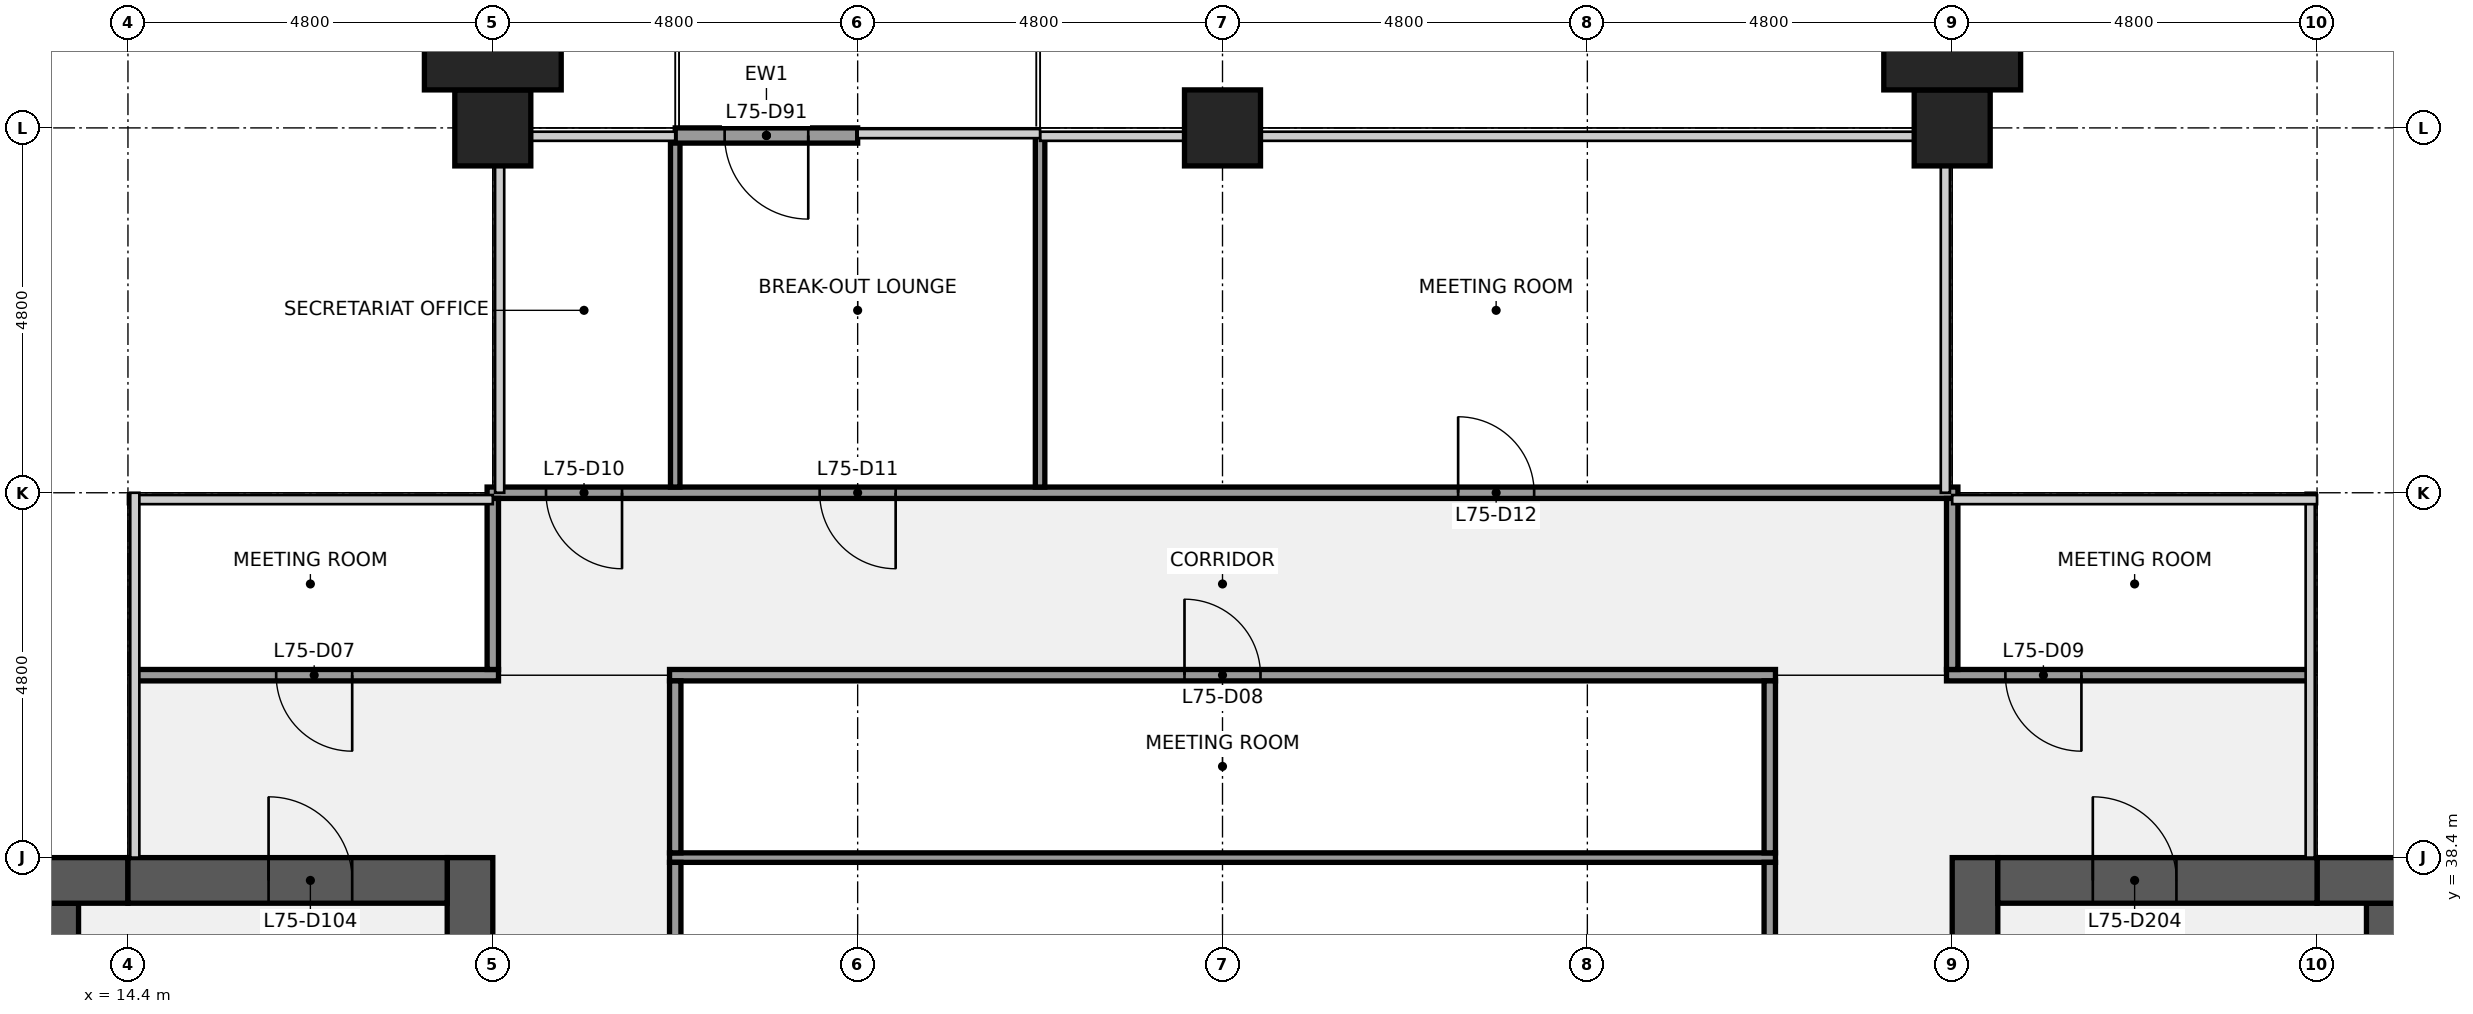
"""IFC4 building model, lengths in metres.
Left out: names, types, materials, properties, quantities, classifications, styles, units other than length and angle.
Written with IfcOpenShell. Run it as: python <this file> out.ifc"""

import sys

from ifc_helpers import new_model, si_unit, direction, frame, frame_2d, origin, origin_2d, place, context, subcontext, project, spatial, rectangle, extrude, element, fill, save


model = new_model("IFC4")
c1 = context("Model", 3, precision=1e-05, world=origin(), true_north=direction((0.0, 1.0)))
c2 = subcontext(c1, "Body", "Model", "MODEL_VIEW")
j1 = project(units=[si_unit("LENGTHUNIT", "METRE"), si_unit("PLANEANGLEUNIT", "RADIAN")], contexts=[c1])
p1 = place(None, origin())
s1 = spatial("IfcSite", under=j1, at=p1, CompositionType="ELEMENT")
p2 = place(p1, origin())
s2 = spatial("IfcBuilding", under=s1, at=p2, CompositionType="ELEMENT")
p3 = place(p2, frame((0.0, 0.0, 338.3)))
s3 = spatial("IfcBuildingStorey", under=s2, at=p3, CompositionType="ELEMENT", Elevation=338.3)
for number, where, z_axis, x_axis in (
    (1, (19.2, 48.0, 0.0), (0.0, 0.0, 1.0), (1.0, 0.0, 0.0)),
    (2, (28.8, 48.0, 0.0), (0.0, 0.0, 1.0), (1.0, 0.0, 0.0)),
    (3, (38.4, 48.0, 0.0), (0.0, 0.0, 1.0), (1.0, 0.0, 0.0)),
):
    element("IfcColumn", number, at=place(p3, frame(where, z_axis=z_axis, x_axis=x_axis)), inside=s3, PredefinedType="COLUMN", context=c2, shape_type="SweptSolid", body=[
        extrude(rectangle(XDim=1.0, YDim=1.0, at=origin_2d()), origin(), (0.0, 0.0, 1.0), 4.0),
    ])
p4 = place(p3, frame((18.9, 38.4, 0.0), z_axis=(0.0, 0.0, 1.0), x_axis=(0.0, -1.0, 0.0)))
e4 = element("IfcWall", 4, at=p4, inside=s3, PredefinedType="SHEAR", context=c2, shape_type="SweptSolid", body=[
    extrude(rectangle(XDim=28.8, YDim=0.6, at=frame_2d((14.4, 0.0))), origin(), (0.0, 0.0, 1.0), 3.84),
])
p5 = place(p4, frame((18.3, 0.0, 0.0)))
e5 = element("IfcOpeningElement", 5, at=p5, cuts=e4, PredefinedType="OPENING", context=c2, shape_type="SweptSolid", body=[
    extrude(rectangle(XDim=1.8, YDim=2.1, at=frame_2d((0.9, 1.05))), frame((0.0, 0.31, 0.0), z_axis=(0.0, -1.0, 0.0), x_axis=(1.0, 0.0, 0.0)), (0.0, 0.0, 1.0), 0.62),
])
p6 = place(p4, frame((8.7, 0.0, 0.0)))
e6 = element("IfcOpeningElement", 6, at=p6, cuts=e4, PredefinedType="OPENING", context=c2, shape_type="SweptSolid", body=[
    extrude(rectangle(XDim=1.8, YDim=2.1, at=frame_2d((0.9, 1.05))), frame((0.0, 0.31, 0.0), z_axis=(0.0, -1.0, 0.0), x_axis=(1.0, 0.0, 0.0)), (0.0, 0.0, 1.0), 0.62),
])
p7 = place(p3, frame((6.25, 37.5, 0.0), z_axis=(0.0, 0.0, 1.0), x_axis=(1.0, 0.0, 0.0)))
e7 = element("IfcWall", 7, at=p7, inside=s3, PredefinedType="SHEAR", context=c2, shape_type="SweptSolid", body=[
    extrude(rectangle(XDim=7.5, YDim=0.6, at=frame_2d((3.75, 0.0))), origin(), (0.0, 0.0, 1.0), 3.84),
])
p8 = place(p3, frame((0.6, 38.1, 0.0), z_axis=(0.0, 0.0, 1.0), x_axis=(1.0, 0.0, 0.0)))
e8 = element("IfcWall", 8, at=p8, inside=s3, PredefinedType="SHEAR", context=c2, shape_type="SweptSolid", body=[
    extrude(rectangle(XDim=13.8, YDim=0.6, at=frame_2d((6.9, 0.0))), origin(), (0.0, 0.0, 1.0), 3.84),
])
p9 = place(p8, frame((5.7, 0.0, 0.9)))
e9 = element("IfcOpeningElement", 9, at=p9, cuts=e8, PredefinedType="OPENING", context=c2, shape_type="SweptSolid", body=[
    extrude(rectangle(XDim=1.8, YDim=1.5, at=frame_2d((0.9, 0.75))), frame((0.0, 0.31, 0.0), z_axis=(0.0, -1.0, 0.0), x_axis=(1.0, 0.0, 0.0)), (0.0, 0.0, 1.0), 0.62),
])
p10 = place(p8, frame((10.5, 0.0, 0.9)))
e10 = element("IfcOpeningElement", 10, at=p10, cuts=e8, PredefinedType="OPENING", context=c2, shape_type="SweptSolid", body=[
    extrude(rectangle(XDim=1.8, YDim=1.5, at=frame_2d((0.9, 0.75))), frame((0.0, 0.31, 0.0), z_axis=(0.0, -1.0, 0.0), x_axis=(1.0, 0.0, 0.0)), (0.0, 0.0, 1.0), 0.62),
])
p11 = place(p3, frame((14.4, 38.1, 0.0), z_axis=(0.0, 0.0, 1.0), x_axis=(1.0, 0.0, 0.0)))
e11 = element("IfcWall", 11, at=p11, inside=s3, PredefinedType="SHEAR", context=c2, shape_type="SweptSolid", body=[
    extrude(rectangle(XDim=4.2, YDim=0.6, at=frame_2d((2.1, 0.0))), origin(), (0.0, 0.0, 1.0), 3.84),
])
p12 = place(p11, frame((1.85, 0.0, 0.0)))
e12 = element("IfcOpeningElement", 12, at=p12, cuts=e11, PredefinedType="OPENING", context=c2, shape_type="SweptSolid", body=[
    extrude(rectangle(XDim=1.1, YDim=2.1, at=frame_2d((0.55, 1.05))), frame((0.0, 0.31, 0.0), z_axis=(0.0, -1.0, 0.0), x_axis=(1.0, 0.0, 0.0)), (0.0, 0.0, 1.0), 0.62),
])
p13 = place(p3, frame((38.7, 9.6, 0.0), z_axis=(0.0, 0.0, 1.0), x_axis=(0.0, 1.0, 0.0)))
e13 = element("IfcWall", 13, at=p13, inside=s3, PredefinedType="SHEAR", context=c2, shape_type="SweptSolid", body=[
    extrude(rectangle(XDim=28.8, YDim=0.6, at=frame_2d((14.4, 0.0))), origin(), (0.0, 0.0, 1.0), 3.84),
])
p14 = place(p13, frame((8.7, 0.0, 0.0)))
e14 = element("IfcOpeningElement", 14, at=p14, cuts=e13, PredefinedType="OPENING", context=c2, shape_type="SweptSolid", body=[
    extrude(rectangle(XDim=1.8, YDim=2.1, at=frame_2d((0.9, 1.05))), frame((0.0, 0.31, 0.0), z_axis=(0.0, -1.0, 0.0), x_axis=(1.0, 0.0, 0.0)), (0.0, 0.0, 1.0), 0.62),
])
p15 = place(p13, frame((18.3, 0.0, 0.0)))
e15 = element("IfcOpeningElement", 15, at=p15, cuts=e13, PredefinedType="OPENING", context=c2, shape_type="SweptSolid", body=[
    extrude(rectangle(XDim=1.8, YDim=2.1, at=frame_2d((0.9, 1.05))), frame((0.0, 0.31, 0.0), z_axis=(0.0, -1.0, 0.0), x_axis=(1.0, 0.0, 0.0)), (0.0, 0.0, 1.0), 0.62),
])
p16 = place(p3, frame((43.85, 37.5, 0.0), z_axis=(0.0, 0.0, 1.0), x_axis=(1.0, 0.0, 0.0)))
e16 = element("IfcWall", 16, at=p16, inside=s3, PredefinedType="SHEAR", context=c2, shape_type="SweptSolid", body=[
    extrude(rectangle(XDim=7.5, YDim=0.6, at=frame_2d((3.75, 0.0))), origin(), (0.0, 0.0, 1.0), 3.84),
])
p17 = place(p3, frame((43.2, 38.1, 0.0), z_axis=(0.0, 0.0, 1.0), x_axis=(1.0, 0.0, 0.0)))
e17 = element("IfcWall", 17, at=p17, inside=s3, PredefinedType="SHEAR", context=c2, shape_type="SweptSolid", body=[
    extrude(rectangle(XDim=13.8, YDim=0.6, at=frame_2d((6.9, 0.0))), origin(), (0.0, 0.0, 1.0), 3.84),
])
p18 = place(p17, frame((6.3, 0.0, 0.9)))
e18 = element("IfcOpeningElement", 18, at=p18, cuts=e17, PredefinedType="OPENING", context=c2, shape_type="SweptSolid", body=[
    extrude(rectangle(XDim=1.8, YDim=1.5, at=frame_2d((0.9, 0.75))), frame((0.0, 0.31, 0.0), z_axis=(0.0, -1.0, 0.0), x_axis=(1.0, 0.0, 0.0)), (0.0, 0.0, 1.0), 0.62),
])
p19 = place(p17, frame((1.5, 0.0, 0.9)))
e19 = element("IfcOpeningElement", 19, at=p19, cuts=e17, PredefinedType="OPENING", context=c2, shape_type="SweptSolid", body=[
    extrude(rectangle(XDim=1.8, YDim=1.5, at=frame_2d((0.9, 0.75))), frame((0.0, 0.31, 0.0), z_axis=(0.0, -1.0, 0.0), x_axis=(1.0, 0.0, 0.0)), (0.0, 0.0, 1.0), 0.62),
])
p20 = place(p3, frame((39.0, 38.1, 0.0), z_axis=(0.0, 0.0, 1.0), x_axis=(1.0, 0.0, 0.0)))
e20 = element("IfcWall", 20, at=p20, inside=s3, PredefinedType="SHEAR", context=c2, shape_type="SweptSolid", body=[
    extrude(rectangle(XDim=4.2, YDim=0.6, at=frame_2d((2.1, 0.0))), origin(), (0.0, 0.0, 1.0), 3.84),
])
p21 = place(p20, frame((1.25, 0.0, 0.0)))
e21 = element("IfcOpeningElement", 21, at=p21, cuts=e20, PredefinedType="OPENING", context=c2, shape_type="SweptSolid", body=[
    extrude(rectangle(XDim=1.1, YDim=2.1, at=frame_2d((0.55, 1.05))), frame((0.0, 0.31, 0.0), z_axis=(0.0, -1.0, 0.0), x_axis=(1.0, 0.0, 0.0)), (0.0, 0.0, 1.0), 0.62),
])
p22 = place(p3, frame((21.525, 38.4, 0.0), z_axis=(0.0, 0.0, 1.0), x_axis=(1.0, 0.0, 0.0)))
e22 = element("IfcWall", 22, at=p22, inside=s3, PredefinedType="PARTITIONING", context=c2, shape_type="SweptSolid", body=[
    extrude(rectangle(XDim=14.55, YDim=0.125, at=frame_2d((7.275, 0.0))), origin(), (0.0, 0.0, 1.0), 2.87),
])
p23 = place(p3, frame((14.5, 40.8, 0.0), z_axis=(0.0, 0.0, 1.0), x_axis=(1.0, 0.0, 0.0)))
e23 = element("IfcWall", 23, at=p23, inside=s3, PredefinedType="PARTITIONING", context=c2, shape_type="SweptSolid", body=[
    extrude(rectangle(XDim=4.775, YDim=0.15, at=frame_2d((2.387, 0.0))), origin(), (0.0, 0.0, 1.0), 2.87),
])
p24 = place(p23, frame((1.85, 0.0, 0.0)))
e24 = element("IfcOpeningElement", 24, at=p24, cuts=e23, PredefinedType="OPENING", context=c2, shape_type="SweptSolid", body=[
    extrude(rectangle(XDim=1.0, YDim=2.1, at=frame_2d((0.5, 1.05))), frame((0.0, 0.085, 0.0), z_axis=(0.0, -1.0, 0.0), x_axis=(1.0, 0.0, 0.0)), (0.0, 0.0, 1.0), 0.17),
])
p25 = place(p3, frame((21.525, 40.8, 0.0), z_axis=(0.0, 0.0, 1.0), x_axis=(1.0, 0.0, 0.0)))
e25 = element("IfcWall", 25, at=p25, inside=s3, PredefinedType="PARTITIONING", context=c2, shape_type="SweptSolid", body=[
    extrude(rectangle(XDim=14.55, YDim=0.15, at=frame_2d((7.275, 0.0))), origin(), (0.0, 0.0, 1.0), 2.87),
])
p26 = place(p25, frame((6.775, 0.0, 0.0)))
e26 = element("IfcOpeningElement", 26, at=p26, cuts=e25, PredefinedType="OPENING", context=c2, shape_type="SweptSolid", body=[
    extrude(rectangle(XDim=1.0, YDim=2.1, at=frame_2d((0.5, 1.05))), frame((0.0, 0.085, 0.0), z_axis=(0.0, -1.0, 0.0), x_axis=(1.0, 0.0, 0.0)), (0.0, 0.0, 1.0), 0.17),
])
p27 = place(p3, frame((38.325, 40.8, 0.0), z_axis=(0.0, 0.0, 1.0), x_axis=(1.0, 0.0, 0.0)))
e27 = element("IfcWall", 27, at=p27, inside=s3, PredefinedType="PARTITIONING", context=c2, shape_type="SweptSolid", body=[
    extrude(rectangle(XDim=4.775, YDim=0.15, at=frame_2d((2.388, 0.0))), origin(), (0.0, 0.0, 1.0), 2.87),
])
p28 = place(p27, frame((0.775, 0.0, 0.0)))
e28 = element("IfcOpeningElement", 28, at=p28, cuts=e27, PredefinedType="OPENING", context=c2, shape_type="SweptSolid", body=[
    extrude(rectangle(XDim=1.0, YDim=2.1, at=frame_2d((0.5, 1.05))), frame((0.0, 0.085, 0.0), z_axis=(0.0, -1.0, 0.0), x_axis=(1.0, 0.0, 0.0)), (0.0, 0.0, 1.0), 0.17),
])
p29 = place(p3, frame((19.125, 43.2, 0.0), z_axis=(0.0, 0.0, 1.0), x_axis=(1.0, 0.0, 0.0)))
e29 = element("IfcWall", 29, at=p29, inside=s3, PredefinedType="PARTITIONING", context=c2, shape_type="SweptSolid", body=[
    extrude(rectangle(XDim=19.35, YDim=0.15, at=frame_2d((9.675, 0.0))), origin(), (0.0, 0.0, 1.0), 2.87),
])
p30 = place(p29, frame((0.775, 0.0, 0.0)))
e30 = element("IfcOpeningElement", 30, at=p30, cuts=e29, PredefinedType="OPENING", context=c2, shape_type="SweptSolid", body=[
    extrude(rectangle(XDim=1.0, YDim=2.1, at=frame_2d((0.5, 1.05))), frame((0.0, 0.085, 0.0), z_axis=(0.0, -1.0, 0.0), x_axis=(1.0, 0.0, 0.0)), (0.0, 0.0, 1.0), 0.17),
])
p31 = place(p29, frame((4.375, 0.0, 0.0)))
e31 = element("IfcOpeningElement", 31, at=p31, cuts=e29, PredefinedType="OPENING", context=c2, shape_type="SweptSolid", body=[
    extrude(rectangle(XDim=1.0, YDim=2.1, at=frame_2d((0.5, 1.05))), frame((0.0, 0.085, 0.0), z_axis=(0.0, -1.0, 0.0), x_axis=(1.0, 0.0, 0.0)), (0.0, 0.0, 1.0), 0.17),
])
p32 = place(p29, frame((12.775, 0.0, 0.0)))
e32 = element("IfcOpeningElement", 32, at=p32, cuts=e29, PredefinedType="OPENING", context=c2, shape_type="SweptSolid", body=[
    extrude(rectangle(XDim=1.0, YDim=2.1, at=frame_2d((0.5, 1.05))), frame((0.0, 0.085, 0.0), z_axis=(0.0, -1.0, 0.0), x_axis=(1.0, 0.0, 0.0)), (0.0, 0.0, 1.0), 0.17),
])
p33 = place(p3, frame((19.2, 40.875, 0.0), z_axis=(0.0, 0.0, 1.0), x_axis=(0.0, 1.0, 0.0)))
e33 = element("IfcWall", 33, at=p33, inside=s3, PredefinedType="PARTITIONING", context=c2, shape_type="SweptSolid", body=[
    extrude(rectangle(XDim=2.25, YDim=0.15, at=frame_2d((1.125, 0.0))), origin(), (0.0, 0.0, 1.0), 2.87),
])
p34 = place(p3, frame((21.6, 43.275, 0.0), z_axis=(0.0, 0.0, 1.0), x_axis=(0.0, 1.0, 0.0)))
e34 = element("IfcWall", 34, at=p34, inside=s3, PredefinedType="PARTITIONING", context=c2, shape_type="SweptSolid", body=[
    extrude(rectangle(XDim=4.625, YDim=0.125, at=frame_2d((2.312, 0.0))), origin(), (0.0, 0.0, 1.0), 2.87),
])
p35 = place(p3, frame((21.6, 28.863, 0.0), z_axis=(0.0, 0.0, 1.0), x_axis=(0.0, 1.0, 0.0)))
e35 = element("IfcWall", 35, at=p35, inside=s3, PredefinedType="PARTITIONING", context=c2, shape_type="SweptSolid", body=[
    extrude(rectangle(XDim=9.475, YDim=0.15, at=frame_2d((4.737, 0.0))), origin(), (0.0, 0.0, 1.0), 2.87),
])
p36 = place(p35, frame((4.238, 0.0, 0.0)))
e36 = element("IfcOpeningElement", 36, at=p36, cuts=e35, PredefinedType="OPENING", context=c2, shape_type="SweptSolid", body=[
    extrude(rectangle(XDim=1.0, YDim=2.1, at=frame_2d((0.5, 1.05))), frame((0.0, 0.085, 0.0), z_axis=(0.0, -1.0, 0.0), x_axis=(1.0, 0.0, 0.0)), (0.0, 0.0, 1.0), 0.17),
])
p37 = place(p3, frame((21.6, 38.462, 0.0), z_axis=(0.0, 0.0, 1.0), x_axis=(0.0, 1.0, 0.0)))
e37 = element("IfcWall", 37, at=p37, inside=s3, PredefinedType="PARTITIONING", context=c2, shape_type="SweptSolid", body=[
    extrude(rectangle(XDim=2.263, YDim=0.15, at=frame_2d((1.131, 0.0))), origin(), (0.0, 0.0, 1.0), 2.87),
])
p38 = place(p3, frame((26.4, 43.275, 0.0), z_axis=(0.0, 0.0, 1.0), x_axis=(0.0, 1.0, 0.0)))
e38 = element("IfcWall", 38, at=p38, inside=s3, PredefinedType="PARTITIONING", context=c2, shape_type="SweptSolid", body=[
    extrude(rectangle(XDim=4.625, YDim=0.125, at=frame_2d((2.312, 0.0))), origin(), (0.0, 0.0, 1.0), 2.87),
])
p39 = place(p3, frame((36.0, 28.863, 0.0), z_axis=(0.0, 0.0, 1.0), x_axis=(0.0, 1.0, 0.0)))
e39 = element("IfcWall", 39, at=p39, inside=s3, PredefinedType="PARTITIONING", context=c2, shape_type="SweptSolid", body=[
    extrude(rectangle(XDim=9.475, YDim=0.15, at=frame_2d((4.737, 0.0))), origin(), (0.0, 0.0, 1.0), 2.87),
])
p40 = place(p3, frame((36.0, 38.462, 0.0), z_axis=(0.0, 0.0, 1.0), x_axis=(0.0, 1.0, 0.0)))
e40 = element("IfcWall", 40, at=p40, inside=s3, PredefinedType="PARTITIONING", context=c2, shape_type="SweptSolid", body=[
    extrude(rectangle(XDim=2.263, YDim=0.15, at=frame_2d((1.131, 0.0))), origin(), (0.0, 0.0, 1.0), 2.87),
])
p41 = place(p3, frame((38.4, 40.875, 0.0), z_axis=(0.0, 0.0, 1.0), x_axis=(0.0, 1.0, 0.0)))
e41 = element("IfcWall", 41, at=p41, inside=s3, PredefinedType="PARTITIONING", context=c2, shape_type="SweptSolid", body=[
    extrude(rectangle(XDim=2.25, YDim=0.15, at=frame_2d((1.125, 0.0))), origin(), (0.0, 0.0, 1.0), 2.87),
])
p42 = place(p3, frame((24.0, 47.9, 0.0), z_axis=(0.0, 0.0, 1.0), x_axis=(-1.0, 0.0, 0.0)))
e42 = element("IfcWall", 42, at=p42, inside=s3, PredefinedType="SOLIDWALL", context=c2, shape_type="SweptSolid", body=[
    extrude(rectangle(XDim=2.4, YDim=0.2, at=frame_2d((1.2, 0.0))), origin(), (0.0, 0.0, 1.0), 3.314),
])
p43 = place(p42, frame((0.65, 0.0, 0.0)))
e43 = element("IfcOpeningElement", 43, at=p43, cuts=e42, PredefinedType="OPENING", context=c2, shape_type="SweptSolid", body=[
    extrude(rectangle(XDim=1.1, YDim=2.1, at=frame_2d((0.55, 1.05))), frame((0.0, 0.11, 0.0), z_axis=(0.0, -1.0, 0.0), x_axis=(1.0, 0.0, 0.0)), (0.0, 0.0, 1.0), 0.22),
])
for number, where, z_axis, x_axis in (
    (44, (19.2, 49.0, 0.0), (0.0, 0.0, 1.0), (1.0, 0.0, 0.0)),
    (45, (38.4, 49.0, 0.0), (0.0, 0.0, 1.0), (1.0, 0.0, 0.0)),
):
    element("IfcColumn", number, at=place(p3, frame(where, z_axis=z_axis, x_axis=x_axis)), inside=s3, PredefinedType="PILASTER", context=c2, shape_type="SweptSolid", body=[
        extrude(rectangle(XDim=1.8, YDim=1.0, at=origin_2d()), origin(), (0.0, 0.0, 1.0), 4.0),
    ])
p44 = place(p12, origin())
e46 = element("IfcDoor", 46, at=p44, inside=s3, OperationType="SINGLE_SWING_LEFT", PredefinedType="DOOR", context=c2, shape_type="SweptSolid", body=[
    extrude(rectangle(XDim=1.1, YDim=2.1, at=frame_2d((0.55, 1.05))), frame((0.0, 0.025, 0.0), z_axis=(0.0, -1.0, 0.0), x_axis=(1.0, 0.0, 0.0)), (0.0, 0.0, 1.0), 0.05),
])
fill(e12, e46)
p45 = place(p21, origin())
e47 = element("IfcDoor", 47, at=p45, inside=s3, OperationType="SINGLE_SWING_LEFT", PredefinedType="DOOR", context=c2, shape_type="SweptSolid", body=[
    extrude(rectangle(XDim=1.1, YDim=2.1, at=frame_2d((0.55, 1.05))), frame((0.0, 0.025, 0.0), z_axis=(0.0, -1.0, 0.0), x_axis=(1.0, 0.0, 0.0)), (0.0, 0.0, 1.0), 0.05),
])
fill(e21, e47)
p46 = place(p24, origin())
e48 = element("IfcDoor", 48, at=p46, inside=s3, OperationType="SINGLE_SWING_RIGHT", PredefinedType="DOOR", context=c2, shape_type="SweptSolid", body=[
    extrude(rectangle(XDim=1.0, YDim=2.1, at=frame_2d((0.5, 1.05))), frame((0.0, 0.025, 0.0), z_axis=(0.0, -1.0, 0.0), x_axis=(1.0, 0.0, 0.0)), (0.0, 0.0, 1.0), 0.05),
])
fill(e24, e48)
p47 = place(p26, origin())
e49 = element("IfcDoor", 49, at=p47, inside=s3, OperationType="SINGLE_SWING_LEFT", PredefinedType="DOOR", context=c2, shape_type="SweptSolid", body=[
    extrude(rectangle(XDim=1.0, YDim=2.1, at=frame_2d((0.5, 1.05))), frame((0.0, 0.025, 0.0), z_axis=(0.0, -1.0, 0.0), x_axis=(1.0, 0.0, 0.0)), (0.0, 0.0, 1.0), 0.05),
])
fill(e26, e49)
p48 = place(p28, origin())
e50 = element("IfcDoor", 50, at=p48, inside=s3, OperationType="SINGLE_SWING_RIGHT", PredefinedType="DOOR", context=c2, shape_type="SweptSolid", body=[
    extrude(rectangle(XDim=1.0, YDim=2.1, at=frame_2d((0.5, 1.05))), frame((0.0, 0.025, 0.0), z_axis=(0.0, -1.0, 0.0), x_axis=(1.0, 0.0, 0.0)), (0.0, 0.0, 1.0), 0.05),
])
fill(e28, e50)
p49 = place(p30, origin())
e51 = element("IfcDoor", 51, at=p49, inside=s3, OperationType="SINGLE_SWING_RIGHT", PredefinedType="DOOR", context=c2, shape_type="SweptSolid", body=[
    extrude(rectangle(XDim=1.0, YDim=2.1, at=frame_2d((0.5, 1.05))), frame((0.0, 0.025, 0.0), z_axis=(0.0, -1.0, 0.0), x_axis=(1.0, 0.0, 0.0)), (0.0, 0.0, 1.0), 0.05),
])
fill(e30, e51)
p50 = place(p31, origin())
e52 = element("IfcDoor", 52, at=p50, inside=s3, OperationType="SINGLE_SWING_RIGHT", PredefinedType="DOOR", context=c2, shape_type="SweptSolid", body=[
    extrude(rectangle(XDim=1.0, YDim=2.1, at=frame_2d((0.5, 1.05))), frame((0.0, 0.025, 0.0), z_axis=(0.0, -1.0, 0.0), x_axis=(1.0, 0.0, 0.0)), (0.0, 0.0, 1.0), 0.05),
])
fill(e31, e52)
p51 = place(p32, origin())
e53 = element("IfcDoor", 53, at=p51, inside=s3, OperationType="SINGLE_SWING_LEFT", PredefinedType="DOOR", context=c2, shape_type="SweptSolid", body=[
    extrude(rectangle(XDim=1.0, YDim=2.1, at=frame_2d((0.5, 1.05))), frame((0.0, 0.025, 0.0), z_axis=(0.0, -1.0, 0.0), x_axis=(1.0, 0.0, 0.0)), (0.0, 0.0, 1.0), 0.05),
])
fill(e32, e53)
p52 = place(p43, origin())
e54 = element("IfcDoor", 54, at=p52, inside=s3, OperationType="SINGLE_SWING_LEFT", PredefinedType="DOOR", context=c2, shape_type="SweptSolid", body=[
    extrude(rectangle(XDim=1.1, YDim=2.1, at=frame_2d((0.55, 1.05))), frame((0.0, 0.025, 0.0), z_axis=(0.0, -1.0, 0.0), x_axis=(1.0, 0.0, 0.0)), (0.0, 0.0, 1.0), 0.05),
])
fill(e43, e54)
save(model, sys.argv[1])
